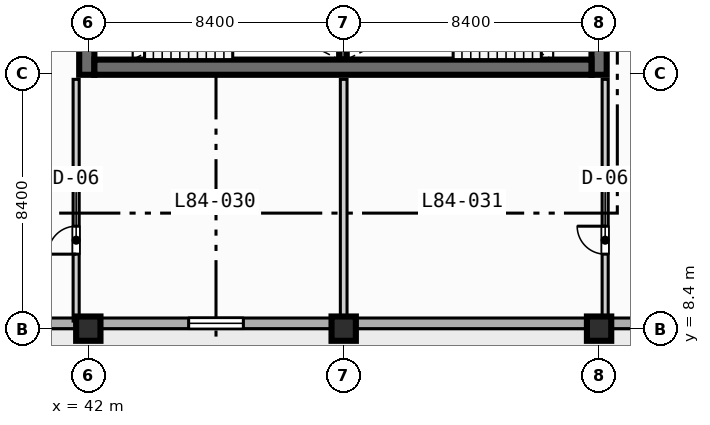
"""IFC4 building model, lengths in metres.
Left out: names, types, materials, properties, quantities, classifications, styles, units other than length and angle.
Written with IfcOpenShell. Run it as: python <this file> out.ifc"""

import sys

from ifc_helpers import new_model, si_unit, direction, frame, frame_2d, origin, origin_2d, place, context, subcontext, project, spatial, rectangle, extrude, element, fill, save


model = new_model("IFC4")
c1 = context("Model", 3, precision=1e-05, world=origin(), true_north=direction((0.0, 1.0)))
c2 = subcontext(c1, "Body", "Model", "MODEL_VIEW")
j1 = project(units=[si_unit("LENGTHUNIT", "METRE"), si_unit("PLANEANGLEUNIT", "RADIAN")], contexts=[c1])
p1 = place(None, origin())
s1 = spatial("IfcSite", under=j1, at=p1, CompositionType="ELEMENT")
p2 = place(p1, origin())
s2 = spatial("IfcBuilding", under=s1, at=p2, CompositionType="ELEMENT")
p3 = place(p2, frame((0.0, 0.0, 339.8)))
s3 = spatial("IfcBuildingStorey", under=s2, at=p3, CompositionType="ELEMENT", Elevation=339.8)
p4 = place(p3, frame((50.375, 17.25, 0.0), z_axis=(0.0, 0.0, 1.0), x_axis=(0.0, 1.0, 0.0)))
e1 = element("IfcWall", 1, at=p4, inside=s3, PredefinedType="SOLIDWALL", context=c2, shape_type="SweptSolid", body=[
    extrude(rectangle(XDim=3.5, YDim=0.25, at=frame_2d((1.75, 0.0))), origin(), (0.0, 0.0, 1.0), 3.67),
])
for number, where, z_axis, x_axis in (
    (2, (41.95, 16.75, 0.0), (0.0, 0.0, 1.0), (0.0, 1.0, 0.0)),
    (3, (58.8, 16.75, 0.0), (0.0, 0.0, 1.0), (0.0, 1.0, 0.0)),
):
    element("IfcWall", number, at=place(p3, frame(where, z_axis=z_axis, x_axis=x_axis)), inside=s3, PredefinedType="SHEAR", context=c2, shape_type="SweptSolid", body=[
        extrude(rectangle(XDim=1.25, YDim=0.5, at=frame_2d((0.625, 0.0))), origin(), (0.0, 0.0, 1.0), 3.67),
    ])
p5 = place(p3, frame((42.2, 17.0, 0.0), z_axis=(0.0, 0.0, 1.0), x_axis=(1.0, 0.0, 0.0)))
e4 = element("IfcWall", 4, at=p5, inside=s3, PredefinedType="SHEAR", context=c2, shape_type="SweptSolid", body=[
    extrude(rectangle(XDim=16.35, YDim=0.5, at=frame_2d((8.175, 0.0))), origin(), (0.0, 0.0, 1.0), 3.67),
])
for number, where, z_axis, x_axis in (
    (5, (42.0, 8.4, 0.0), (0.0, 0.0, 1.0), (1.0, 0.0, 0.0)),
    (6, (50.4, 8.4, 0.0), (0.0, 0.0, 1.0), (1.0, 0.0, 0.0)),
    (7, (58.8, 8.4, 0.0), (0.0, 0.0, 1.0), (1.0, 0.0, 0.0)),
):
    element("IfcColumn", number, at=place(p3, frame(where, z_axis=z_axis, x_axis=x_axis)), inside=s3, PredefinedType="COLUMN", context=c2, shape_type="SweptSolid", body=[
        extrude(rectangle(XDim=0.8, YDim=0.8, at=origin_2d()), origin(), (0.0, 0.0, 1.0), 3.9),
    ])
p6 = place(p3, frame((64.025, 8.575, 0.0), z_axis=(0.0, 0.0, 1.0), x_axis=(-1.0, 0.0, 0.0)))
e8 = element("IfcWall", 8, at=p6, inside=s3, PredefinedType="STANDARD", context=c2, shape_type="SweptSolid", body=[
    extrude(rectangle(XDim=52.45, YDim=0.35, at=frame_2d((26.225, 0.0))), origin(), (0.0, 0.0, 1.0), 3.67),
])
p7 = place(p6, frame((33.925, 0.0, 0.0)))
e9 = element("IfcOpeningElement", 9, at=p7, cuts=e8, PredefinedType="OPENING", context=c2, shape_type="SweptSolid", body=[
    extrude(rectangle(XDim=1.4, YDim=2.2, at=frame_2d((0.7, 1.1))), frame((0.0, 0.185, 0.0), z_axis=(0.0, -1.0, 0.0), x_axis=(1.0, 0.0, 0.0)), (0.0, 0.0, 1.0), 0.37),
])
p8 = place(p6, frame((25.025, 0.0, 0.85)))
e10 = element("IfcOpeningElement", 10, at=p8, cuts=e8, PredefinedType="OPENING", context=c2, shape_type="SweptSolid", body=[
    extrude(rectangle(XDim=2.4, YDim=1.95, at=frame_2d((1.2, 0.975))), frame((0.0, 0.185, 0.0), z_axis=(0.0, -1.0, 0.0), x_axis=(1.0, 0.0, 0.0)), (0.0, 0.0, 1.0), 0.37),
])
p9 = place(p6, frame((16.925, 0.0, 0.85)))
e11 = element("IfcOpeningElement", 11, at=p9, cuts=e8, PredefinedType="OPENING", context=c2, shape_type="SweptSolid", body=[
    extrude(rectangle(XDim=1.8, YDim=1.8, at=frame_2d((0.9, 0.9))), frame((0.0, 0.185, 0.0), z_axis=(0.0, -1.0, 0.0), x_axis=(1.0, 0.0, 0.0)), (0.0, 0.0, 1.0), 0.37),
])
p10 = place(p6, frame((41.815, 0.0, 0.85)))
e12 = element("IfcOpeningElement", 12, at=p10, cuts=e8, PredefinedType="OPENING", context=c2, shape_type="SweptSolid", body=[
    extrude(rectangle(XDim=1.8, YDim=1.8, at=frame_2d((0.9, 0.9))), frame((0.0, 0.185, 0.0), z_axis=(0.0, -1.0, 0.0), x_axis=(1.0, 0.0, 0.0)), (0.0, 0.0, 1.0), 0.37),
])
p11 = place(p6, frame((49.535, 0.0, 0.85)))
e13 = element("IfcOpeningElement", 13, at=p11, cuts=e8, PredefinedType="OPENING", context=c2, shape_type="SweptSolid", body=[
    extrude(rectangle(XDim=1.8, YDim=1.8, at=frame_2d((0.9, 0.9))), frame((0.0, 0.185, 0.0), z_axis=(0.0, -1.0, 0.0), x_axis=(1.0, 0.0, 0.0)), (0.0, 0.0, 1.0), 0.37),
])
p12 = place(p3, frame((41.6, 8.65, 0.0), z_axis=(0.0, 0.0, 1.0), x_axis=(0.0, 1.0, 0.0)))
e14 = element("IfcWall", 14, at=p12, inside=s3, PredefinedType="PARTITIONING", context=c2, shape_type="SweptSolid", body=[
    extrude(rectangle(XDim=7.95, YDim=0.2, at=frame_2d((3.975, 0.0))), origin(), (0.0, 0.0, 1.0), 3.67),
])
p13 = place(p12, frame((2.2, 0.0, 0.0)))
e15 = element("IfcOpeningElement", 15, at=p13, cuts=e14, PredefinedType="OPENING", context=c2, shape_type="SweptSolid", body=[
    extrude(rectangle(XDim=0.92, YDim=2.1, at=frame_2d((0.46, 1.05))), frame((0.0, 0.11, 0.0), z_axis=(0.0, -1.0, 0.0), x_axis=(1.0, 0.0, 0.0)), (0.0, 0.0, 1.0), 0.22),
])
p14 = place(p3, frame((59.0, 8.65, 0.0), z_axis=(0.0, 0.0, 1.0), x_axis=(0.0, 1.0, 0.0)))
e16 = element("IfcWall", 16, at=p14, inside=s3, PredefinedType="PARTITIONING", context=c2, shape_type="SweptSolid", body=[
    extrude(rectangle(XDim=7.95, YDim=0.2, at=frame_2d((3.975, 0.0))), origin(), (0.0, 0.0, 1.0), 3.207),
])
p15 = place(p14, frame((2.2, 0.0, 0.0)))
e17 = element("IfcOpeningElement", 17, at=p15, cuts=e16, PredefinedType="OPENING", context=c2, shape_type="SweptSolid", body=[
    extrude(rectangle(XDim=0.92, YDim=2.1, at=frame_2d((0.46, 1.05))), frame((0.0, 0.11, 0.0), z_axis=(0.0, -1.0, 0.0), x_axis=(1.0, 0.0, 0.0)), (0.0, 0.0, 1.0), 0.22),
])
p16 = place(p3, frame((50.4, 8.65, 0.0), z_axis=(0.0, 0.0, 1.0), x_axis=(0.0, 1.0, 0.0)))
e18 = element("IfcWall", 18, at=p16, inside=s3, PredefinedType="PARTITIONING", context=c2, shape_type="SweptSolid", body=[
    extrude(rectangle(XDim=7.95, YDim=0.22, at=frame_2d((3.975, 0.0))), origin(), (0.0, 0.0, 1.0), 3.07),
])
p17 = place(p9, origin())
e19 = element("IfcWindow", 19, at=p17, inside=s3, PartitioningType="SINGLE_PANEL", PredefinedType="WINDOW", context=c2, shape_type="SweptSolid", body=[
    extrude(rectangle(XDim=1.8, YDim=1.8, at=frame_2d((0.9, 0.9))), frame((0.0, 0.03, 0.0), z_axis=(0.0, -1.0, 0.0), x_axis=(1.0, 0.0, 0.0)), (0.0, 0.0, 1.0), 0.06),
])
fill(e11, e19)
p18 = place(p13, origin())
e20 = element("IfcDoor", 20, at=p18, inside=s3, OperationType="SINGLE_SWING_LEFT", PredefinedType="DOOR", context=c2, shape_type="SweptSolid", body=[
    extrude(rectangle(XDim=0.92, YDim=2.1, at=frame_2d((0.46, 1.05))), frame((0.0, 0.025, 0.0), z_axis=(0.0, -1.0, 0.0), x_axis=(1.0, 0.0, 0.0)), (0.0, 0.0, 1.0), 0.05),
])
fill(e15, e20)
p19 = place(p15, origin())
e21 = element("IfcDoor", 21, at=p19, inside=s3, OperationType="SINGLE_SWING_RIGHT", PredefinedType="DOOR", context=c2, shape_type="SweptSolid", body=[
    extrude(rectangle(XDim=0.92, YDim=2.1, at=frame_2d((0.46, 1.05))), frame((0.0, 0.025, 0.0), z_axis=(0.0, -1.0, 0.0), x_axis=(1.0, 0.0, 0.0)), (0.0, 0.0, 1.0), 0.05),
])
fill(e17, e21)
save(model, sys.argv[1])
